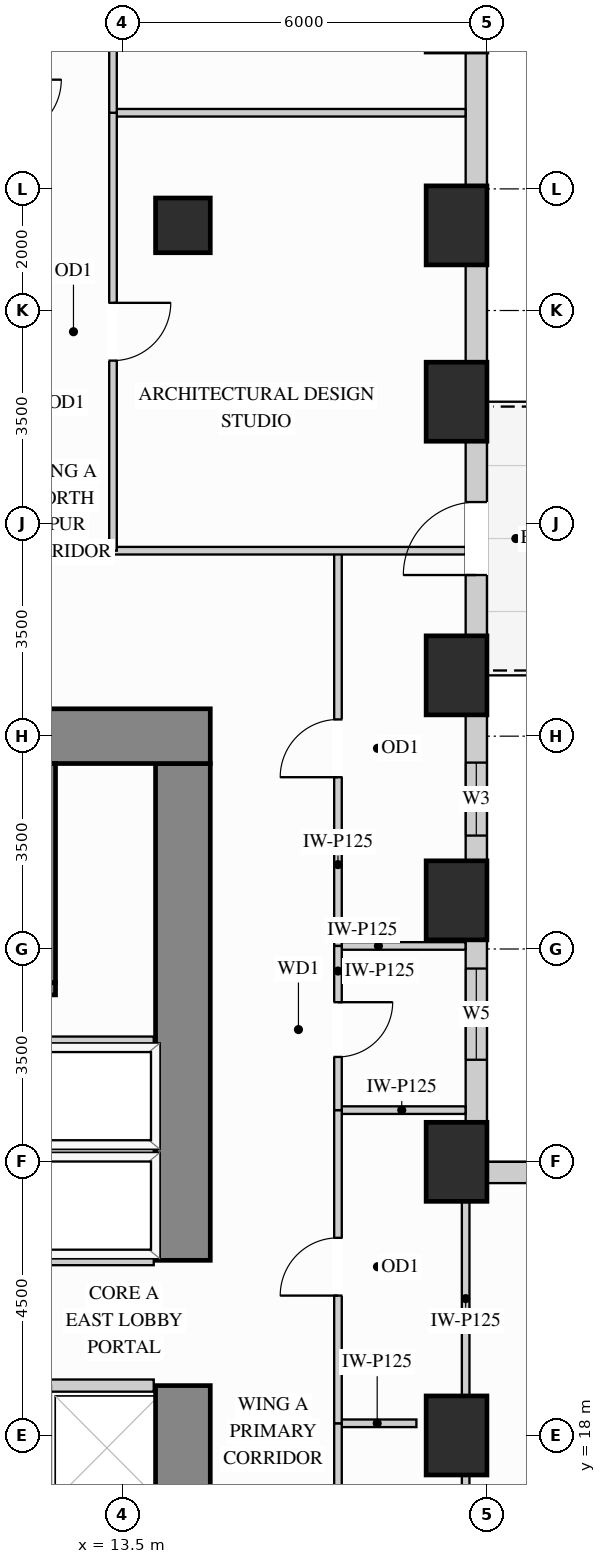
"""IFC4 building model, lengths in metres.
Left out: names, types, materials, properties, quantities, classifications, styles, units other than length and angle.
Written with IfcOpenShell. Run it as: python <this file> out.ifc"""

import sys

from ifc_helpers import new_model, si_unit, direction, frame, frame_2d, origin, origin_2d, place, context, subcontext, project, spatial, rectangle, extrude, source, transform, mapped, element, fill, save


model = new_model("IFC4")
c1 = context("Model", 3, precision=1e-05, world=origin(), true_north=direction((0.0, 1.0)))
c2 = subcontext(c1, "Body", "Model", "MODEL_VIEW")
j1 = project(units=[si_unit("LENGTHUNIT", "METRE"), si_unit("PLANEANGLEUNIT", "RADIAN")], contexts=[c1])
p1 = place(None, origin())
s1 = spatial("IfcSite", under=j1, at=p1, CompositionType="ELEMENT")
p2 = place(p1, origin())
s2 = spatial("IfcBuilding", under=s1, at=p2, CompositionType="ELEMENT")
p3 = place(p2, frame((0.0, 0.0, 26.1)))
s3 = spatial("IfcBuildingStorey", under=s2, at=p3, CompositionType="ELEMENT", Elevation=26.1)
m1 = source(origin(), c2, "Body", "SweptSolid", [
    extrude(rectangle(XDim=0.9, YDim=0.9, at=origin_2d()), origin(), (0.0, 0.0, 1.0), 3.38),
])
p4 = place(p3, frame((14.5, 37.9, 0.0), z_axis=(0.0, 0.0, 1.0), x_axis=(1.0, 0.0, 0.0)))
e1 = element("IfcColumn", 1, at=p4, inside=s3, PredefinedType="COLUMN", context=c2, shape_type="MappedRepresentation", body=[
    mapped(m1, transform((0.0, 0.0, 0.0), x_axis=(1.0, 0.0, 0.0), y_axis=(0.0, 1.0, 0.0), z_axis=(0.0, 0.0, 1.0))),
])
m2 = source(origin(), c2, "Body", "SweptSolid", [
    extrude(rectangle(XDim=1.0, YDim=1.3, at=origin_2d()), origin(), (0.0, 0.0, 1.0), 3.38),
])
for number, where, z_axis, x_axis in (
    (2, (19.0, 18.0, 0.0), (0.0, 0.0, 1.0), (1.0, 0.0, 0.0)),
    (3, (19.0, 22.5, 0.0), (0.0, 0.0, 1.0), (1.0, 0.0, 0.0)),
    (4, (19.0, 26.8, 0.0), (0.0, 0.0, 1.0), (1.0, 0.0, 0.0)),
    (5, (19.0, 30.5, 0.0), (0.0, 0.0, 1.0), (1.0, 0.0, 0.0)),
    (6, (19.0, 35.0, 0.0), (0.0, 0.0, 1.0), (1.0, 0.0, 0.0)),
    (7, (19.0, 37.9, 0.0), (0.0, 0.0, 1.0), (1.0, 0.0, 0.0)),
    (8, (19.0, 41.4, 0.0), (0.0, 0.0, 1.0), (1.0, 0.0, 0.0)),
):
    element("IfcColumn", number, at=place(p3, frame(where, z_axis=z_axis, x_axis=x_axis)), inside=s3, PredefinedType="COLUMN", context=c2, shape_type="MappedRepresentation", body=[
        mapped(m2, transform((0.0, 0.0, 0.0), x_axis=(1.0, 0.0, 0.0), y_axis=(0.0, 1.0, 0.0), z_axis=(0.0, 0.0, 1.0))),
    ])
m3 = source(origin(), c2, "Body", "SweptSolid", [
    extrude(rectangle(XDim=9.87, YDim=0.9, at=frame_2d((4.935, 0.0))), origin(), (0.0, 0.0, 1.0), 3.38),
])
p5 = place(p3, frame((14.5, 8.95, 0.0), z_axis=(0.0, 0.0, 1.0), x_axis=(0.0, 1.0, 0.0)))
e9 = element("IfcWall", 9, at=p5, inside=s3, PredefinedType="SHEAR", context=c2, shape_type="MappedRepresentation", body=[
    mapped(m3, transform((0.0, 0.0, 0.0), x_axis=(1.0, 0.0, 0.0), y_axis=(0.0, 1.0, 0.0), z_axis=(0.0, 0.0, 1.0))),
])
m4 = source(origin(), c2, "Body", "SweptSolid", [
    extrude(rectangle(XDim=8.17, YDim=0.9, at=frame_2d((4.085, 0.0))), origin(), (0.0, 0.0, 1.0), 3.38),
])
p6 = place(p3, frame((14.5, 20.88, 0.0), z_axis=(0.0, 0.0, 1.0), x_axis=(0.0, 1.0, 0.0)))
e10 = element("IfcWall", 10, at=p6, inside=s3, PredefinedType="SHEAR", context=c2, shape_type="MappedRepresentation", body=[
    mapped(m4, transform((0.0, 0.0, 0.0), x_axis=(1.0, 0.0, 0.0), y_axis=(0.0, 1.0, 0.0), z_axis=(0.0, 0.0, 1.0))),
])
m5 = source(origin(), c2, "Body", "SweptSolid", [
    extrude(rectangle(XDim=10.9, YDim=0.9, at=frame_2d((5.45, 0.0))), origin(), (0.0, 0.0, 1.0), 3.38),
])
p7 = place(p3, frame((4.05, 29.5, 0.0), z_axis=(0.0, 0.0, 1.0), x_axis=(1.0, 0.0, 0.0)))
e11 = element("IfcWall", 11, at=p7, inside=s3, PredefinedType="SHEAR", context=c2, shape_type="MappedRepresentation", body=[
    mapped(m5, transform((0.0, 0.0, 0.0), x_axis=(1.0, 0.0, 0.0), y_axis=(0.0, 1.0, 0.0), z_axis=(0.0, 0.0, 1.0))),
])
p8 = place(p3, frame((34.352, 22.325, 0.0), z_axis=(0.0, 0.0, 1.0), x_axis=(-1.0, 0.0, 0.0)))
e12 = element("IfcWall", 12, at=p8, inside=s3, PredefinedType="SOLIDWALL", context=c2, shape_type="SweptSolid", body=[
    extrude(rectangle(XDim=14.854, YDim=0.35, at=frame_2d((7.427, 0.0))), origin(), (0.0, 0.0, 1.0), 3.365),
])
p9 = place(p8, frame((4.058, 0.0, 0.78)))
e13 = element("IfcOpeningElement", 13, at=p9, cuts=e12, PredefinedType="OPENING", context=c2, shape_type="SweptSolid", body=[
    extrude(rectangle(XDim=1.5, YDim=2.0, at=frame_2d((0.75, 1.0))), frame((0.0, 0.185, 0.0), z_axis=(0.0, -1.0, 0.0), x_axis=(1.0, 0.0, 0.0)), (0.0, 0.0, 1.0), 0.37),
])
p10 = place(p8, frame((9.296, 0.0, 0.78)))
e14 = element("IfcOpeningElement", 14, at=p10, cuts=e12, PredefinedType="OPENING", context=c2, shape_type="SweptSolid", body=[
    extrude(rectangle(XDim=1.5, YDim=2.0, at=frame_2d((0.75, 1.0))), frame((0.0, 0.185, 0.0), z_axis=(0.0, -1.0, 0.0), x_axis=(1.0, 0.0, 0.0)), (0.0, 0.0, 1.0), 0.37),
])
p11 = place(p3, frame((19.325, 23.148, 0.0), z_axis=(0.0, 0.0, 1.0), x_axis=(0.0, 1.0, 0.0)))
e15 = element("IfcWall", 15, at=p11, inside=s3, PredefinedType="SOLIDWALL", context=c2, shape_type="SweptSolid", body=[
    extrude(rectangle(XDim=3.004, YDim=0.35, at=frame_2d((1.502, 0.0))), origin(), (0.0, 0.0, 1.0), 2.51),
])
p12 = place(p11, frame((1.031, 0.0, 0.78)))
e16 = element("IfcOpeningElement", 16, at=p12, cuts=e15, PredefinedType="OPENING", context=c2, shape_type="SweptSolid", body=[
    extrude(rectangle(XDim=1.5, YDim=1.55, at=frame_2d((0.75, 0.775))), frame((0.0, 0.185, 0.0), z_axis=(0.0, -1.0, 0.0), x_axis=(1.0, 0.0, 0.0)), (0.0, 0.0, 1.0), 0.37),
])
p13 = place(p3, frame((19.325, 27.448, 0.0), z_axis=(0.0, 0.0, 1.0), x_axis=(0.0, 1.0, 0.0)))
e17 = element("IfcWall", 17, at=p13, inside=s3, PredefinedType="SOLIDWALL", context=c2, shape_type="SweptSolid", body=[
    extrude(rectangle(XDim=2.404, YDim=0.35, at=frame_2d((1.202, 0.0))), origin(), (0.0, 0.0, 1.0), 2.51),
])
p14 = place(p13, frame((0.417, 0.0, 0.78)))
e18 = element("IfcOpeningElement", 18, at=p14, cuts=e17, PredefinedType="OPENING", context=c2, shape_type="SweptSolid", body=[
    extrude(rectangle(XDim=1.2, YDim=1.55, at=frame_2d((0.6, 0.775))), frame((0.0, 0.185, 0.0), z_axis=(0.0, -1.0, 0.0), x_axis=(1.0, 0.0, 0.0)), (0.0, 0.0, 1.0), 0.37),
])
p15 = place(p3, frame((19.325, 31.148, 0.0), z_axis=(0.0, 0.0, 1.0), x_axis=(0.0, 1.0, 0.0)))
e19 = element("IfcWall", 19, at=p15, inside=s3, PredefinedType="SOLIDWALL", context=c2, shape_type="SweptSolid", body=[
    extrude(rectangle(XDim=3.204, YDim=0.35, at=frame_2d((1.602, 0.0))), origin(), (0.0, 0.0, 1.0), 2.51),
])
p16 = place(p15, frame((1.002, 0.0, 0.0)))
e20 = element("IfcOpeningElement", 20, at=p16, cuts=e19, PredefinedType="OPENING", context=c2, shape_type="SweptSolid", body=[
    extrude(rectangle(XDim=1.2, YDim=2.15, at=frame_2d((0.6, 1.075))), frame((0.0, 0.185, 0.0), z_axis=(0.0, -1.0, 0.0), x_axis=(1.0, 0.0, 0.0)), (0.0, 0.0, 1.0), 0.37),
])
m6 = source(origin(), c2, "Body", "SweptSolid", [
    extrude(rectangle(XDim=1.604, YDim=0.35, at=frame_2d((0.802, 0.0))), origin(), (0.0, 0.0, 1.0), 2.51),
])
p17 = place(p3, frame((19.325, 35.648, 0.0), z_axis=(0.0, 0.0, 1.0), x_axis=(0.0, 1.0, 0.0)))
e21 = element("IfcWall", 21, at=p17, inside=s3, PredefinedType="SOLIDWALL", context=c2, shape_type="MappedRepresentation", body=[
    mapped(m6, transform((0.0, 0.0, 0.0), x_axis=(1.0, 0.0, 0.0), y_axis=(0.0, 1.0, 0.0), z_axis=(0.0, 0.0, 1.0))),
])
m7 = source(origin(), c2, "Body", "SweptSolid", [
    extrude(rectangle(XDim=2.204, YDim=0.35, at=frame_2d((1.102, 0.0))), origin(), (0.0, 0.0, 1.0), 2.51),
])
p18 = place(p3, frame((19.325, 38.548, 0.0), z_axis=(0.0, 0.0, 1.0), x_axis=(0.0, 1.0, 0.0)))
e22 = element("IfcWall", 22, at=p18, inside=s3, PredefinedType="SOLIDWALL", context=c2, shape_type="MappedRepresentation", body=[
    mapped(m7, transform((0.0, 0.0, 0.0), x_axis=(1.0, 0.0, 0.0), y_axis=(0.0, 1.0, 0.0), z_axis=(0.0, 0.0, 1.0))),
])
m8 = source(origin(), c2, "Body", "SweptSolid", [
    extrude(rectangle(XDim=1.29, YDim=0.125, at=frame_2d((0.645, 0.0))), origin(), (0.0, 0.0, 1.0), 2.67),
])
p19 = place(p3, frame((17.05, 18.2, 0.0), z_axis=(0.0, 0.0, 1.0), x_axis=(1.0, 0.0, 0.0)))
e23 = element("IfcWall", 23, at=p19, inside=s3, PredefinedType="PARTITIONING", context=c2, shape_type="MappedRepresentation", body=[
    mapped(m8, transform((0.0, 0.0, 0.0), x_axis=(1.0, 0.0, 0.0), y_axis=(0.0, 1.0, 0.0), z_axis=(0.0, 0.0, 1.0))),
])
m9 = source(origin(), c2, "Body", "SweptSolid", [
    extrude(rectangle(XDim=2.098, YDim=0.125, at=frame_2d((1.049, 0.0))), origin(), (0.0, 0.0, 1.0), 3.365),
])
for number, where, z_axis, x_axis in (
    (24, (17.05, 23.35, 0.0), (0.0, 0.0, 1.0), (1.0, 0.0, 0.0)),
    (25, (17.05, 26.05, 0.0), (0.0, 0.0, 1.0), (1.0, 0.0, 0.0)),
):
    element("IfcWall", number, at=place(p3, frame(where, z_axis=z_axis, x_axis=x_axis)), inside=s3, PredefinedType="PARTITIONING", context=c2, shape_type="MappedRepresentation", body=[
        mapped(m9, transform((0.0, 0.0, 0.0), x_axis=(1.0, 0.0, 0.0), y_axis=(0.0, 1.0, 0.0), z_axis=(0.0, 0.0, 1.0))),
    ])
m10 = source(origin(), c2, "Body", "SweptSolid", [
    extrude(rectangle(XDim=3.18, YDim=0.125, at=frame_2d((1.59, 0.0))), origin(), (0.0, 0.0, 1.0), 2.67),
])
for number, where, z_axis, x_axis in (
    (26, (19.15, 14.16, 0.0), (0.0, 0.0, 1.0), (0.0, 1.0, 0.0)),
    (27, (19.15, 18.66, 0.0), (0.0, 0.0, 1.0), (0.0, 1.0, 0.0)),
):
    element("IfcWall", number, at=place(p3, frame(where, z_axis=z_axis, x_axis=x_axis)), inside=s3, PredefinedType="PARTITIONING", context=c2, shape_type="MappedRepresentation", body=[
        mapped(m10, transform((0.0, 0.0, 0.0), x_axis=(1.0, 0.0, 0.0), y_axis=(0.0, 1.0, 0.0), z_axis=(0.0, 0.0, 1.0))),
    ])
p20 = place(p3, frame((17.05, 12.35, 0.0), z_axis=(0.0, 0.0, 1.0), x_axis=(0.0, 1.0, 0.0)))
e28 = element("IfcWall", 28, at=p20, inside=s3, PredefinedType="PARTITIONING", context=c2, shape_type="SweptSolid", body=[
    extrude(rectangle(XDim=5.85, YDim=0.125, at=frame_2d((2.925, 0.0))), origin(), (0.0, 0.0, 1.0), 3.365),
])
p21 = place(p20, frame((2.45, 0.0, 0.0)))
e29 = element("IfcOpeningElement", 29, at=p21, cuts=e28, PredefinedType="OPENING", context=c2, shape_type="SweptSolid", body=[
    extrude(rectangle(XDim=0.95, YDim=2.15, at=frame_2d((0.475, 1.075))), frame((0.0, 0.073, 0.0), z_axis=(0.0, -1.0, 0.0), x_axis=(1.0, 0.0, 0.0)), (0.0, 0.0, 1.0), 0.145),
])
p22 = place(p3, frame((17.05, 18.2, 0.0), z_axis=(0.0, 0.0, 1.0), x_axis=(0.0, 1.0, 0.0)))
e30 = element("IfcWall", 30, at=p22, inside=s3, PredefinedType="PARTITIONING", context=c2, shape_type="SweptSolid", body=[
    extrude(rectangle(XDim=5.15, YDim=0.125, at=frame_2d((2.575, 0.0))), origin(), (0.0, 0.0, 1.0), 3.365),
])
p23 = place(p22, frame((2.1, 0.0, 0.0)))
e31 = element("IfcOpeningElement", 31, at=p23, cuts=e30, PredefinedType="OPENING", context=c2, shape_type="SweptSolid", body=[
    extrude(rectangle(XDim=0.95, YDim=2.15, at=frame_2d((0.475, 1.075))), frame((0.0, 0.073, 0.0), z_axis=(0.0, -1.0, 0.0), x_axis=(1.0, 0.0, 0.0)), (0.0, 0.0, 1.0), 0.145),
])
p24 = place(p3, frame((17.05, 26.05, 0.0), z_axis=(0.0, 0.0, 1.0), x_axis=(0.0, 1.0, 0.0)))
e32 = element("IfcWall", 32, at=p24, inside=s3, PredefinedType="PARTITIONING", context=c2, shape_type="SweptSolid", body=[
    extrude(rectangle(XDim=6.5, YDim=0.125, at=frame_2d((3.25, 0.0))), origin(), (0.0, 0.0, 1.0), 3.365),
])
p25 = place(p24, frame((2.775, 0.0, 0.0)))
e33 = element("IfcOpeningElement", 33, at=p25, cuts=e32, PredefinedType="OPENING", context=c2, shape_type="SweptSolid", body=[
    extrude(rectangle(XDim=0.95, YDim=2.15, at=frame_2d((0.475, 1.075))), frame((0.0, 0.073, 0.0), z_axis=(0.0, -1.0, 0.0), x_axis=(1.0, 0.0, 0.0)), (0.0, 0.0, 1.0), 0.145),
])
p26 = place(p3, frame((17.05, 23.35, 0.0), z_axis=(0.0, 0.0, 1.0), x_axis=(0.0, 1.0, 0.0)))
e34 = element("IfcWall", 34, at=p26, inside=s3, PredefinedType="PARTITIONING", context=c2, shape_type="SweptSolid", body=[
    extrude(rectangle(XDim=2.7, YDim=0.125, at=frame_2d((1.35, 0.0))), origin(), (0.0, 0.0, 1.0), 3.365),
])
p27 = place(p26, frame((0.875, 0.0, 0.0)))
e35 = element("IfcOpeningElement", 35, at=p27, cuts=e34, PredefinedType="OPENING", context=c2, shape_type="SweptSolid", body=[
    extrude(rectangle(XDim=0.9, YDim=2.15, at=frame_2d((0.45, 1.075))), frame((0.0, 0.073, 0.0), z_axis=(0.0, -1.0, 0.0), x_axis=(1.0, 0.0, 0.0)), (0.0, 0.0, 1.0), 0.145),
])
m11 = source(origin(), c2, "Body", "SweptSolid", [
    extrude(rectangle(XDim=5.798, YDim=0.125, at=frame_2d((2.899, 0.0))), origin(), (0.0, 0.0, 1.0), 2.828),
])
p28 = place(p3, frame((13.35, 39.752, 0.0), z_axis=(0.0, 0.0, 1.0), x_axis=(1.0, 0.0, 0.0)))
e36 = element("IfcWall", 36, at=p28, inside=s3, PredefinedType="PARTITIONING", context=c2, shape_type="MappedRepresentation", body=[
    mapped(m11, transform((0.0, 0.0, 0.0), x_axis=(1.0, 0.0, 0.0), y_axis=(0.0, 1.0, 0.0), z_axis=(0.0, 0.0, 1.0))),
])
m12 = source(origin(), c2, "Body", "SweptSolid", [
    extrude(rectangle(XDim=5.798, YDim=0.125, at=frame_2d((2.899, 0.0))), origin(), (0.0, 0.0, 1.0), 3.365),
])
p29 = place(p3, frame((13.35, 32.55, 0.0), z_axis=(0.0, 0.0, 1.0), x_axis=(1.0, 0.0, 0.0)))
e37 = element("IfcWall", 37, at=p29, inside=s3, PredefinedType="PARTITIONING", context=c2, shape_type="MappedRepresentation", body=[
    mapped(m12, transform((0.0, 0.0, 0.0), x_axis=(1.0, 0.0, 0.0), y_axis=(0.0, 1.0, 0.0), z_axis=(0.0, 0.0, 1.0))),
])
p30 = place(p3, frame((13.35, 32.55, 0.0), z_axis=(0.0, 0.0, 1.0), x_axis=(0.0, 1.0, 0.0)))
e38 = element("IfcWall", 38, at=p30, inside=s3, PredefinedType="PARTITIONING", context=c2, shape_type="SweptSolid", body=[
    extrude(rectangle(XDim=7.202, YDim=0.125, at=frame_2d((3.601, 0.0))), origin(), (0.0, 0.0, 1.0), 3.365),
])
p31 = place(p30, frame((3.126, 0.0, 0.0)))
e39 = element("IfcOpeningElement", 39, at=p31, cuts=e38, PredefinedType="OPENING", context=c2, shape_type="SweptSolid", body=[
    extrude(rectangle(XDim=0.95, YDim=2.15, at=frame_2d((0.475, 1.075))), frame((0.0, 0.073, 0.0), z_axis=(0.0, -1.0, 0.0), x_axis=(1.0, 0.0, 0.0)), (0.0, 0.0, 1.0), 0.145),
])
p32 = place(p3, frame((13.35, 39.752, 0.0), z_axis=(0.0, 0.0, 1.0), x_axis=(0.0, 1.0, 0.0)))
e40 = element("IfcWall", 40, at=p32, inside=s3, PredefinedType="PARTITIONING", context=c2, shape_type="SweptSolid", body=[
    extrude(rectangle(XDim=6.648, YDim=0.125, at=frame_2d((3.324, 0.0))), origin(), (0.0, 0.0, 1.0), 3.365),
])
p33 = place(p32, frame((2.849, 0.0, 0.0)))
e41 = element("IfcOpeningElement", 41, at=p33, cuts=e40, PredefinedType="OPENING", context=c2, shape_type="SweptSolid", body=[
    extrude(rectangle(XDim=0.95, YDim=2.15, at=frame_2d((0.475, 1.075))), frame((0.0, 0.073, 0.0), z_axis=(0.0, -1.0, 0.0), x_axis=(1.0, 0.0, 0.0)), (0.0, 0.0, 1.0), 0.145),
])
m13 = source(origin(), c2, "Body", "SweptSolid", [
    extrude(rectangle(XDim=2.19, YDim=0.2, at=frame_2d((1.095, 0.0))), origin(), (0.0, 0.0, 1.0), 3.365),
])
for number, where, z_axis, x_axis in (
    (42, (11.83, 22.66, 0.0), (0.0, 0.0, 1.0), (1.0, 0.0, 0.0)),
    (43, (11.83, 20.9, 0.0), (0.0, 0.0, 1.0), (1.0, 0.0, 0.0)),
    (44, (11.83, 24.46, 0.0), (0.0, 0.0, 1.0), (1.0, 0.0, 0.0)),
):
    element("IfcWall", number, at=place(p3, frame(where, z_axis=z_axis, x_axis=x_axis)), inside=s3, PredefinedType="PARTITIONING", context=c2, shape_type="MappedRepresentation", body=[
        mapped(m13, transform((0.0, 0.0, 0.0), x_axis=(1.0, 0.0, 0.0), y_axis=(0.0, 1.0, 0.0), z_axis=(0.0, 0.0, 1.0))),
    ])
m14 = source(origin(), c2, "Body", "SweptSolid", [
    extrude(rectangle(XDim=1.79, YDim=0.2, at=frame_2d((0.895, 0.0))), origin(), (0.0, 0.0, 1.0), 3.365),
])
p34 = place(p3, frame((12.23, 18.82, 0.0), z_axis=(0.0, 0.0, 1.0), x_axis=(1.0, 0.0, 0.0)))
e45 = element("IfcWall", 45, at=p34, inside=s3, PredefinedType="PARTITIONING", context=c2, shape_type="MappedRepresentation", body=[
    mapped(m14, transform((0.0, 0.0, 0.0), x_axis=(1.0, 0.0, 0.0), y_axis=(0.0, 1.0, 0.0), z_axis=(0.0, 0.0, 1.0))),
])
m15 = source(origin(), c2, "Body", "SweptSolid", [
    extrude(rectangle(XDim=3.603, YDim=0.2, at=frame_2d((1.802, 0.0))), origin(), (0.0, 0.0, 1.0), 3.38),
])
p35 = place(p3, frame((12.305, 25.445, 0.0), z_axis=(0.0, 0.0, 1.0), x_axis=(0.0, 1.0, 0.0)))
e46 = element("IfcWall", 46, at=p35, inside=s3, PredefinedType="SHEAR", context=c2, shape_type="MappedRepresentation", body=[
    mapped(m15, transform((0.0, 0.0, 0.0), x_axis=(1.0, 0.0, 0.0), y_axis=(0.0, 1.0, 0.0), z_axis=(0.0, 0.0, 1.0))),
])
p36 = place(p3, frame((4.952, 25.345, 0.0), z_axis=(0.0, 0.0, 1.0), x_axis=(1.0, 0.0, 0.0)))
e47 = element("IfcWall", 47, at=p36, inside=s3, PredefinedType="SHEAR", context=c2, shape_type="SweptSolid", body=[
    extrude(rectangle(XDim=7.453, YDim=0.2, at=frame_2d((3.727, 0.0))), origin(), (0.0, 0.0, 1.0), 3.38),
])
p37 = place(p36, frame((0.4, 0.0, 0.0)))
e48 = element("IfcOpeningElement", 48, at=p37, cuts=e47, PredefinedType="OPENING", context=c2, shape_type="SweptSolid", body=[
    extrude(rectangle(XDim=1.1, YDim=2.15, at=frame_2d((0.55, 1.075))), frame((0.0, 0.11, 0.0), z_axis=(0.0, -1.0, 0.0), x_axis=(1.0, 0.0, 0.0)), (0.0, 0.0, 1.0), 0.22),
])
m16 = source(origin(), c2, "Body", "SweptSolid", [
    extrude(rectangle(XDim=1.2, YDim=2.15, at=frame_2d((0.6, 1.075))), frame((0.0, 0.025, 0.0), z_axis=(0.0, -1.0, 0.0), x_axis=(1.0, 0.0, 0.0)), (0.0, 0.0, 1.0), 0.05),
])
p38 = place(p16, frame((1.2, 0.0, 0.0), z_axis=(0.0, 0.0, 1.0), x_axis=(-1.0, 0.0, 0.0)))
e49 = element("IfcDoor", 49, at=p38, inside=s3, OperationType="SINGLE_SWING_LEFT", PredefinedType="DOOR", context=c2, shape_type="MappedRepresentation", body=[
    mapped(m16, transform((0.0, 0.0, 0.0), x_axis=(1.0, 0.0, 0.0), y_axis=(0.0, 1.0, 0.0), z_axis=(0.0, 0.0, 1.0))),
])
fill(e20, e49)
m17 = source(origin(), c2, "Body", "SweptSolid", [
    extrude(rectangle(XDim=0.95, YDim=2.15, at=frame_2d((0.475, 1.075))), frame((0.0, 0.025, 0.0), z_axis=(0.0, -1.0, 0.0), x_axis=(1.0, 0.0, 0.0)), (0.0, 0.0, 1.0), 0.05),
])
p39 = place(p23, origin())
e50 = element("IfcDoor", 50, at=p39, inside=s3, OperationType="SINGLE_SWING_LEFT", PredefinedType="DOOR", context=c2, shape_type="MappedRepresentation", body=[
    mapped(m17, transform((0.0, 0.0, 0.0), x_axis=(1.0, 0.0, 0.0), y_axis=(0.0, 1.0, 0.0), z_axis=(0.0, 0.0, 1.0))),
])
fill(e31, e50)
p40 = place(p25, origin())
e51 = element("IfcDoor", 51, at=p40, inside=s3, OperationType="SINGLE_SWING_LEFT", PredefinedType="DOOR", context=c2, shape_type="MappedRepresentation", body=[
    mapped(m17, transform((0.0, 0.0, 0.0), x_axis=(1.0, 0.0, 0.0), y_axis=(0.0, 1.0, 0.0), z_axis=(0.0, 0.0, 1.0))),
])
fill(e33, e51)
p41 = place(p31, origin())
e52 = element("IfcDoor", 52, at=p41, inside=s3, OperationType="SINGLE_SWING_RIGHT", PredefinedType="DOOR", context=c2, shape_type="MappedRepresentation", body=[
    mapped(m17, transform((0.0, 0.0, 0.0), x_axis=(1.0, 0.0, 0.0), y_axis=(0.0, 1.0, 0.0), z_axis=(0.0, 0.0, 1.0))),
])
fill(e39, e52)
m18 = source(origin(), c2, "Body", "SweptSolid", [
    extrude(rectangle(XDim=0.9, YDim=2.15, at=frame_2d((0.45, 1.075))), frame((0.0, 0.025, 0.0), z_axis=(0.0, -1.0, 0.0), x_axis=(1.0, 0.0, 0.0)), (0.0, 0.0, 1.0), 0.05),
])
p42 = place(p27, origin())
e53 = element("IfcDoor", 53, at=p42, inside=s3, OperationType="SINGLE_SWING_RIGHT", PredefinedType="DOOR", context=c2, shape_type="MappedRepresentation", body=[
    mapped(m18, transform((0.0, 0.0, 0.0), x_axis=(1.0, 0.0, 0.0), y_axis=(0.0, 1.0, 0.0), z_axis=(0.0, 0.0, 1.0))),
])
fill(e35, e53)
m19 = source(origin(), c2, "Body", "SweptSolid", [
    extrude(rectangle(XDim=1.2, YDim=1.55, at=frame_2d((0.6, 0.775))), frame((0.0, 0.03, 0.0), z_axis=(0.0, -1.0, 0.0), x_axis=(1.0, 0.0, 0.0)), (0.0, 0.0, 1.0), 0.06),
])
p43 = place(p14, origin())
e54 = element("IfcWindow", 54, at=p43, inside=s3, PartitioningType="SINGLE_PANEL", PredefinedType="WINDOW", context=c2, shape_type="MappedRepresentation", body=[
    mapped(m19, transform((0.0, 0.0, 0.0), x_axis=(1.0, 0.0, 0.0), y_axis=(0.0, 1.0, 0.0), z_axis=(0.0, 0.0, 1.0))),
])
fill(e18, e54)
m20 = source(origin(), c2, "Body", "SweptSolid", [
    extrude(rectangle(XDim=1.5, YDim=1.55, at=frame_2d((0.75, 0.775))), frame((0.0, 0.03, 0.0), z_axis=(0.0, -1.0, 0.0), x_axis=(1.0, 0.0, 0.0)), (0.0, 0.0, 1.0), 0.06),
])
p44 = place(p12, origin())
e55 = element("IfcWindow", 55, at=p44, inside=s3, PartitioningType="SINGLE_PANEL", PredefinedType="WINDOW", context=c2, shape_type="MappedRepresentation", body=[
    mapped(m20, transform((0.0, 0.0, 0.0), x_axis=(1.0, 0.0, 0.0), y_axis=(0.0, 1.0, 0.0), z_axis=(0.0, 0.0, 1.0))),
])
fill(e16, e55)
save(model, sys.argv[1])
